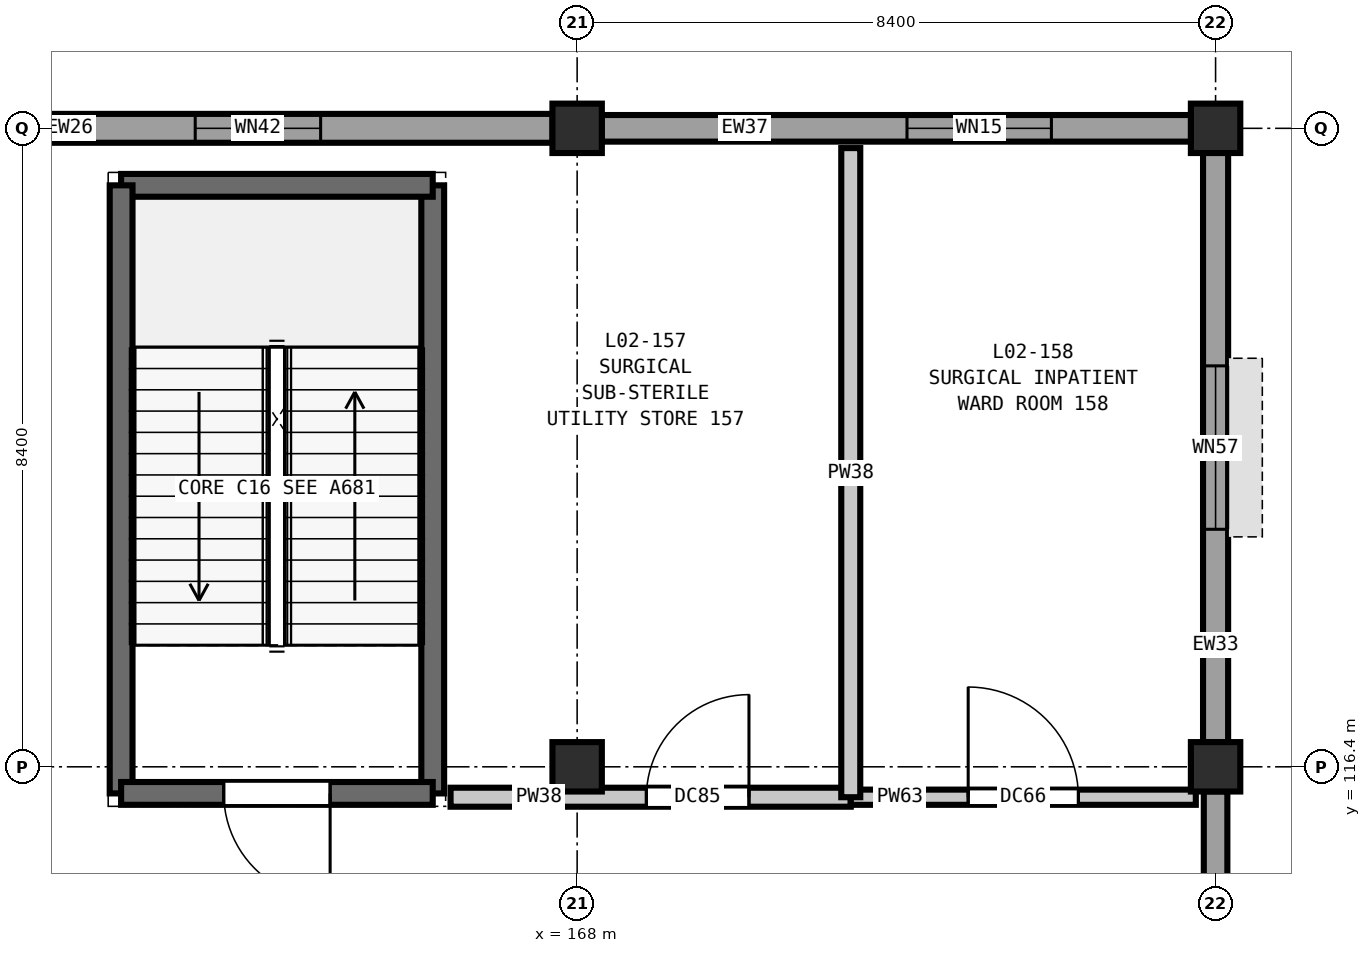
"""IFC4 building model, lengths in metres.
Left out: names, types, materials, properties, quantities, classifications, styles, units other than length and angle.
Written with IfcOpenShell. Run it as: python <this file> out.ifc"""

import sys

from ifc_helpers import new_model, si_unit, direction, frame, frame_2d, origin, origin_2d, place, context, subcontext, project, spatial, rectangle, extrude, element, fill, save


model = new_model("IFC4")
c1 = context("Model", 3, precision=1e-05, world=origin(), true_north=direction((0.0, 1.0)))
c2 = subcontext(c1, "Body", "Model", "MODEL_VIEW")
j1 = project(units=[si_unit("LENGTHUNIT", "METRE"), si_unit("PLANEANGLEUNIT", "RADIAN")], contexts=[c1])
p1 = place(None, origin())
s1 = spatial("IfcSite", under=j1, at=p1, CompositionType="ELEMENT")
p2 = place(p1, origin())
s2 = spatial("IfcBuilding", under=s1, at=p2, CompositionType="ELEMENT")
p3 = place(p2, frame((0.0, 0.0, 10.8)))
s3 = spatial("IfcBuildingStorey", under=s2, at=p3, CompositionType="ELEMENT", Elevation=10.8)
for number, where, z_axis, x_axis in (
    (1, (168.0, 116.4, 0.0), (0.0, 0.0, 1.0), (1.0, 0.0, 0.0)),
    (2, (168.0, 124.8, 0.0), (0.0, 0.0, 1.0), (1.0, 0.0, 0.0)),
    (3, (176.4, 116.4, 0.0), (0.0, 0.0, 1.0), (1.0, 0.0, 0.0)),
    (4, (176.4, 124.8, 0.0), (0.0, 0.0, 1.0), (1.0, 0.0, 0.0)),
):
    element("IfcColumn", number, at=place(p3, frame(where, z_axis=z_axis, x_axis=x_axis)), inside=s3, PredefinedType="COLUMN", context=c2, shape_type="SweptSolid", body=[
        extrude(rectangle(XDim=0.65, YDim=0.65, at=origin_2d()), origin(), (0.0, 0.0, 1.0), 5.4),
    ])
p4 = place(p3, frame((159.923, 124.8, 0.0), z_axis=(0.0, 0.0, 1.0), x_axis=(1.0, 0.0, 0.0)))
e5 = element("IfcWall", 5, at=p4, inside=s3, PredefinedType="SOLIDWALL", context=c2, shape_type="SweptSolid", body=[
    extrude(rectangle(XDim=7.754, YDim=0.38, at=frame_2d((3.877, 0.0))), origin(), (0.0, 0.0, 1.0), 4.68),
])
p5 = place(p4, frame((3.052, 0.0, 0.9)))
e6 = element("IfcOpeningElement", 6, at=p5, cuts=e5, PredefinedType="OPENING", context=c2, shape_type="SweptSolid", body=[
    extrude(rectangle(XDim=1.65, YDim=2.15, at=frame_2d((0.825, 1.075))), frame((0.0, 0.2, 0.0), z_axis=(0.0, -1.0, 0.0), x_axis=(1.0, 0.0, 0.0)), (0.0, 0.0, 1.0), 0.4),
])
p6 = place(p3, frame((168.323, 124.8, 0.0), z_axis=(0.0, 0.0, 1.0), x_axis=(1.0, 0.0, 0.0)))
e7 = element("IfcWall", 7, at=p6, inside=s3, PredefinedType="SOLIDWALL", context=c2, shape_type="SweptSolid", body=[
    extrude(rectangle(XDim=7.754, YDim=0.35, at=frame_2d((3.877, 0.0))), origin(), (0.0, 0.0, 1.0), 4.68),
])
p7 = place(p6, frame((4.017, 0.0, 0.9)))
e8 = element("IfcOpeningElement", 8, at=p7, cuts=e7, PredefinedType="OPENING", context=c2, shape_type="SweptSolid", body=[
    extrude(rectangle(XDim=1.9, YDim=2.15, at=frame_2d((0.95, 1.075))), frame((0.0, 0.185, 0.0), z_axis=(0.0, -1.0, 0.0), x_axis=(1.0, 0.0, 0.0)), (0.0, 0.0, 1.0), 0.37),
])
p8 = place(p3, frame((176.4, 124.477, 0.0), z_axis=(0.0, 0.0, 1.0), x_axis=(0.0, -1.0, 0.0)))
e9 = element("IfcWall", 9, at=p8, inside=s3, PredefinedType="SOLIDWALL", context=c2, shape_type="SweptSolid", body=[
    extrude(rectangle(XDim=7.754, YDim=0.33, at=frame_2d((3.877, 0.0))), origin(), (0.0, 0.0, 1.0), 4.68),
])
p9 = place(p8, frame((2.802, 0.0, 0.9)))
e10 = element("IfcOpeningElement", 10, at=p9, cuts=e9, PredefinedType="OPENING", context=c2, shape_type="SweptSolid", body=[
    extrude(rectangle(XDim=2.15, YDim=2.15, at=frame_2d((1.075, 1.075))), frame((0.0, 0.175, 0.0), z_axis=(0.0, -1.0, 0.0), x_axis=(1.0, 0.0, 0.0)), (0.0, 0.0, 1.0), 0.35),
])
p10 = place(p3, frame((176.4, 116.077, 0.0), z_axis=(0.0, 0.0, 1.0), x_axis=(0.0, -1.0, 0.0)))
e11 = element("IfcWall", 11, at=p10, inside=s3, PredefinedType="SOLIDWALL", context=c2, shape_type="SweptSolid", body=[
    extrude(rectangle(XDim=6.554, YDim=0.31, at=frame_2d((3.277, 0.0))), origin(), (0.0, 0.0, 1.0), 4.68),
])
p11 = place(p3, frame((166.1, 116.05, 0.0), z_axis=(0.0, 0.0, 1.0), x_axis=(0.0, 1.0, 0.0)))
e12 = element("IfcWall", 12, at=p11, inside=s3, PredefinedType="SHEAR", context=c2, shape_type="SweptSolid", body=[
    extrude(rectangle(XDim=8.0, YDim=0.3, at=frame_2d((4.0, 0.0))), origin(), (0.0, 0.0, 1.0), 5.4),
])
p12 = place(p3, frame((166.1, 124.05, 0.0), z_axis=(0.0, 0.0, 1.0), x_axis=(-1.0, 0.0, 0.0)))
e13 = element("IfcWall", 13, at=p12, inside=s3, PredefinedType="SHEAR", context=c2, shape_type="SweptSolid", body=[
    extrude(rectangle(XDim=4.1, YDim=0.3, at=frame_2d((2.05, 0.0))), origin(), (0.0, 0.0, 1.0), 5.4),
])
p13 = place(p3, frame((162.0, 124.05, 0.0), z_axis=(0.0, 0.0, 1.0), x_axis=(0.0, -1.0, 0.0)))
e14 = element("IfcWall", 14, at=p13, inside=s3, PredefinedType="SHEAR", context=c2, shape_type="SweptSolid", body=[
    extrude(rectangle(XDim=8.0, YDim=0.3, at=frame_2d((4.0, 0.0))), origin(), (0.0, 0.0, 1.0), 5.4),
])
p14 = place(p3, frame((162.0, 116.05, 0.0), z_axis=(0.0, 0.0, 1.0), x_axis=(1.0, 0.0, 0.0)))
e15 = element("IfcWall", 15, at=p14, inside=s3, PredefinedType="SHEAR", context=c2, shape_type="SweptSolid", body=[
    extrude(rectangle(XDim=4.1, YDim=0.3, at=frame_2d((2.05, 0.0))), origin(), (0.0, 0.0, 1.0), 5.4),
])
p15 = place(p14, frame((1.35, 0.0, 0.0)))
e16 = element("IfcOpeningElement", 16, at=p15, cuts=e15, PredefinedType="OPENING", context=c2, shape_type="SweptSolid", body=[
    extrude(rectangle(XDim=1.4, YDim=2.2, at=frame_2d((0.7, 1.1))), frame((0.0, 0.16, 0.0), z_axis=(0.0, -1.0, 0.0), x_axis=(1.0, 0.0, 0.0)), (0.0, 0.0, 1.0), 0.32),
])
p16 = place(p3, frame((166.335, 116.0, 0.0), z_axis=(0.0, 0.0, 1.0), x_axis=(1.0, 0.0, 0.0)))
e17 = element("IfcWall", 17, at=p16, inside=s3, PredefinedType="PARTITIONING", context=c2, shape_type="SweptSolid", body=[
    extrude(rectangle(XDim=5.265, YDim=0.25, at=frame_2d((2.633, 0.0))), origin(), (0.0, 0.0, 1.0), 5.07),
])
p17 = place(p16, frame((2.576, 0.0, 0.0)))
e18 = element("IfcOpeningElement", 18, at=p17, cuts=e17, PredefinedType="OPENING", context=c2, shape_type="SweptSolid", body=[
    extrude(rectangle(XDim=1.35, YDim=2.2, at=frame_2d((0.675, 1.1))), frame((0.0, 0.135, 0.0), z_axis=(0.0, -1.0, 0.0), x_axis=(1.0, 0.0, 0.0)), (0.0, 0.0, 1.0), 0.27),
])
p18 = place(p3, frame((171.6, 116.0, 0.0), z_axis=(0.0, 0.0, 1.0), x_axis=(1.0, 0.0, 0.0)))
e19 = element("IfcWall", 19, at=p18, inside=s3, PredefinedType="PARTITIONING", context=c2, shape_type="SweptSolid", body=[
    extrude(rectangle(XDim=4.54, YDim=0.2, at=frame_2d((2.27, 0.0))), origin(), (0.0, 0.0, 1.0), 5.07),
])
p19 = place(p18, frame((1.545, 0.0, 0.0)))
e20 = element("IfcOpeningElement", 20, at=p19, cuts=e19, PredefinedType="OPENING", context=c2, shape_type="SweptSolid", body=[
    extrude(rectangle(XDim=1.45, YDim=2.25, at=frame_2d((0.725, 1.125))), frame((0.0, 0.11, 0.0), z_axis=(0.0, -1.0, 0.0), x_axis=(1.0, 0.0, 0.0)), (0.0, 0.0, 1.0), 0.22),
])
p20 = place(p3, frame((171.6, 116.0, 0.0), z_axis=(0.0, 0.0, 1.0), x_axis=(0.0, 1.0, 0.0)))
e21 = element("IfcWall", 21, at=p20, inside=s3, PredefinedType="PARTITIONING", context=c2, shape_type="SweptSolid", body=[
    extrude(rectangle(XDim=8.54, YDim=0.25, at=frame_2d((4.27, 0.0))), origin(), (0.0, 0.0, 1.0), 5.07),
])
p21 = place(p5, origin())
e22 = element("IfcWindow", 22, at=p21, inside=s3, PartitioningType="DOUBLE_PANEL_VERTICAL", PredefinedType="WINDOW", context=c2, shape_type="SweptSolid", body=[
    extrude(rectangle(XDim=1.65, YDim=2.15, at=frame_2d((0.825, 1.075))), frame((0.0, 0.03, 0.0), z_axis=(0.0, -1.0, 0.0), x_axis=(1.0, 0.0, 0.0)), (0.0, 0.0, 1.0), 0.06),
])
fill(e6, e22)
p22 = place(p7, origin())
e23 = element("IfcWindow", 23, at=p22, inside=s3, PartitioningType="DOUBLE_PANEL_VERTICAL", PredefinedType="WINDOW", context=c2, shape_type="SweptSolid", body=[
    extrude(rectangle(XDim=1.9, YDim=2.15, at=frame_2d((0.95, 1.075))), frame((0.0, 0.03, 0.0), z_axis=(0.0, -1.0, 0.0), x_axis=(1.0, 0.0, 0.0)), (0.0, 0.0, 1.0), 0.06),
])
fill(e8, e23)
p23 = place(p9, origin())
e24 = element("IfcWindow", 24, at=p23, inside=s3, PartitioningType="DOUBLE_PANEL_VERTICAL", PredefinedType="WINDOW", context=c2, shape_type="SweptSolid", body=[
    extrude(rectangle(XDim=2.15, YDim=2.15, at=frame_2d((1.075, 1.075))), frame((0.0, 0.03, 0.0), z_axis=(0.0, -1.0, 0.0), x_axis=(1.0, 0.0, 0.0)), (0.0, 0.0, 1.0), 0.06),
])
fill(e10, e24)
p24 = place(p15, frame((1.4, 0.0, 0.0), z_axis=(0.0, 0.0, 1.0), x_axis=(-1.0, 0.0, 0.0)))
e25 = element("IfcDoor", 25, at=p24, inside=s3, OperationType="SINGLE_SWING_LEFT", PredefinedType="DOOR", context=c2, shape_type="SweptSolid", body=[
    extrude(rectangle(XDim=1.4, YDim=2.2, at=frame_2d((0.7, 1.1))), frame((0.0, 0.025, 0.0), z_axis=(0.0, -1.0, 0.0), x_axis=(1.0, 0.0, 0.0)), (0.0, 0.0, 1.0), 0.05),
])
fill(e16, e25)
p25 = place(p17, origin())
e26 = element("IfcDoor", 26, at=p25, inside=s3, OperationType="SINGLE_SWING_RIGHT", PredefinedType="DOOR", context=c2, shape_type="SweptSolid", body=[
    extrude(rectangle(XDim=1.35, YDim=2.2, at=frame_2d((0.675, 1.1))), frame((0.0, 0.025, 0.0), z_axis=(0.0, -1.0, 0.0), x_axis=(1.0, 0.0, 0.0)), (0.0, 0.0, 1.0), 0.05),
])
fill(e18, e26)
p26 = place(p19, origin())
e27 = element("IfcDoor", 27, at=p26, inside=s3, OperationType="SINGLE_SWING_LEFT", PredefinedType="DOOR", context=c2, shape_type="SweptSolid", body=[
    extrude(rectangle(XDim=1.45, YDim=2.25, at=frame_2d((0.725, 1.125))), frame((0.0, 0.025, 0.0), z_axis=(0.0, -1.0, 0.0), x_axis=(1.0, 0.0, 0.0)), (0.0, 0.0, 1.0), 0.05),
])
fill(e20, e27)
save(model, sys.argv[1])
